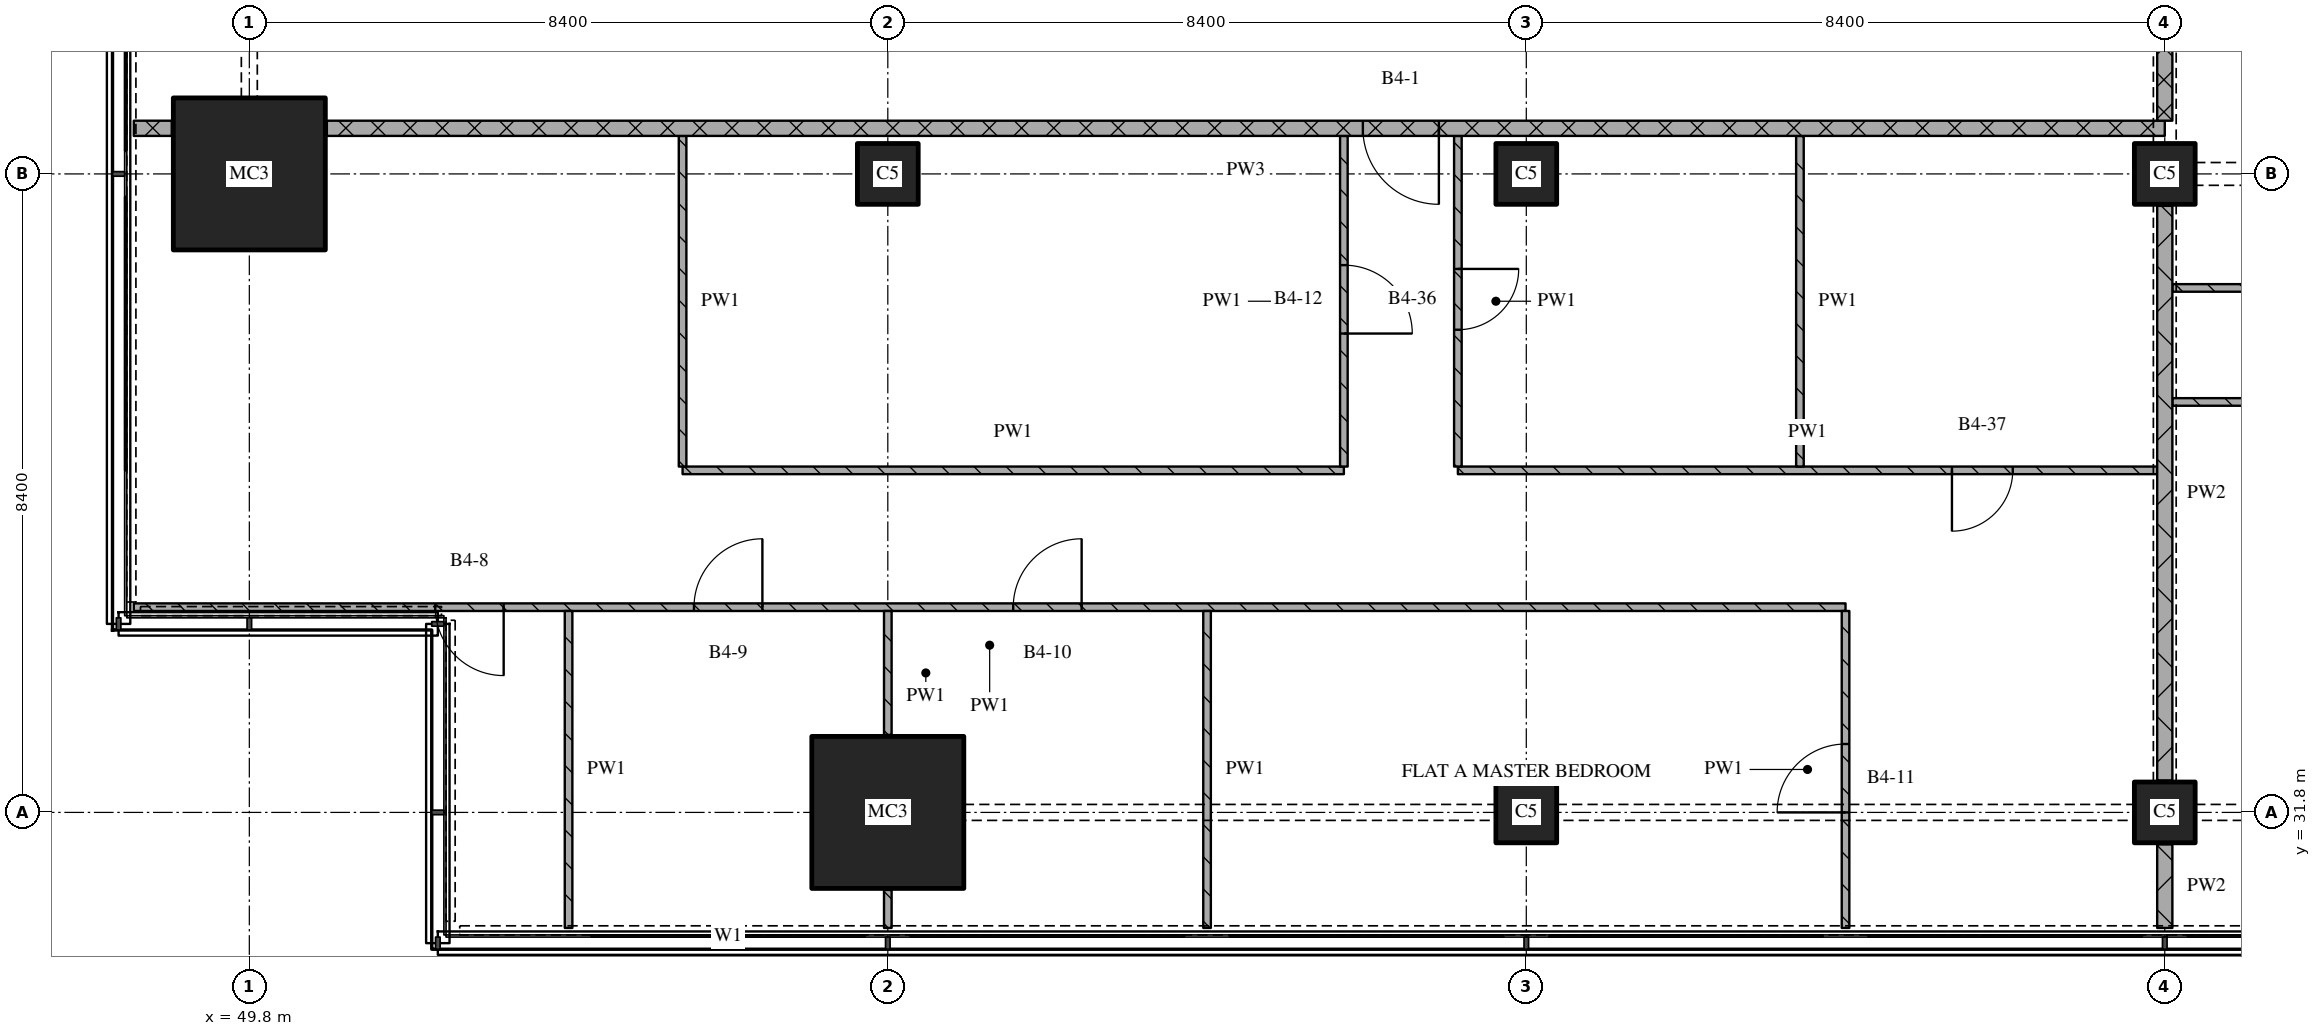
"""IFC4 building model, lengths in metres.
Left out: names, types, materials, properties, quantities, classifications, styles, units other than length and angle.
Written with IfcOpenShell. Run it as: python <this file> out.ifc"""

import sys

from ifc_helpers import new_model, si_unit, direction, frame, frame_2d, origin, origin_2d, place, context, subcontext, project, spatial, rectangle, extrude, element, fill, save


model = new_model("IFC4")
c1 = context("Model", 3, precision=1e-05, world=origin(), true_north=direction((0.0, 1.0)))
c2 = subcontext(c1, "Body", "Model", "MODEL_VIEW")
j1 = project(units=[si_unit("LENGTHUNIT", "METRE"), si_unit("PLANEANGLEUNIT", "RADIAN")], contexts=[c1])
p1 = place(None, origin())
s1 = spatial("IfcSite", under=j1, at=p1, CompositionType="ELEMENT")
p2 = place(p1, origin())
s2 = spatial("IfcBuilding", under=s1, at=p2, CompositionType="ELEMENT")
p3 = place(p2, frame((0.0, 0.0, 131.25)))
s3 = spatial("IfcBuildingStorey", under=s2, at=p3, CompositionType="ELEMENT", Elevation=131.25)
for number, where, z_axis, x_axis in (
    (1, (49.8, 40.2, 0.0), (0.0, 0.0, 1.0), (1.0, 0.0, 0.0)),
    (2, (58.2, 31.8, 0.0), (0.0, 0.0, 1.0), (1.0, 0.0, 0.0)),
):
    element("IfcColumn", number, at=place(p3, frame(where, z_axis=z_axis, x_axis=x_axis)), inside=s3, PredefinedType="COLUMN", context=c2, shape_type="SweptSolid", body=[
        extrude(rectangle(XDim=2.0, YDim=2.0, at=origin_2d()), origin(), (0.0, 0.0, 1.0), 3.6),
    ])
for number, where, z_axis, x_axis in (
    (3, (58.2, 40.2, 0.0), (0.0, 0.0, 1.0), (1.0, 0.0, 0.0)),
    (4, (66.6, 31.8, 0.0), (0.0, 0.0, 1.0), (1.0, 0.0, 0.0)),
    (5, (66.6, 40.2, 0.0), (0.0, 0.0, 1.0), (1.0, 0.0, 0.0)),
    (6, (75.0, 31.8, 0.0), (0.0, 0.0, 1.0), (1.0, 0.0, 0.0)),
    (7, (75.0, 40.2, 0.0), (0.0, 0.0, 1.0), (1.0, 0.0, 0.0)),
):
    element("IfcColumn", number, at=place(p3, frame(where, z_axis=z_axis, x_axis=x_axis)), inside=s3, PredefinedType="COLUMN", context=c2, shape_type="SweptSolid", body=[
        extrude(rectangle(XDim=0.8, YDim=0.8, at=origin_2d()), origin(), (0.0, 0.0, 1.0), 3.6),
    ])
p4 = place(p3, frame((70.8, 34.5, 0.0), z_axis=(0.0, 0.0, 1.0), x_axis=(-1.0, 0.0, 0.0)))
e8 = element("IfcWall", 8, at=p4, inside=s3, PredefinedType="PARTITIONING", context=c2, shape_type="SweptSolid", body=[
    extrude(rectangle(XDim=22.52, YDim=0.1, at=frame_2d((11.26, 0.0))), origin(), (0.0, 0.0, 1.0), 3.32),
])
p5 = place(p4, frame((10.05, 0.0, 0.0)))
e9 = element("IfcOpeningElement", 9, at=p5, cuts=e8, PredefinedType="OPENING", context=c2, shape_type="SweptSolid", body=[
    extrude(rectangle(XDim=0.9, YDim=2.1, at=frame_2d((0.45, 1.05))), frame((0.0, 0.06, 0.0), z_axis=(0.0, -1.0, 0.0), x_axis=(1.0, 0.0, 0.0)), (0.0, 0.0, 1.0), 0.12),
])
p6 = place(p4, frame((14.25, 0.0, 0.0)))
e10 = element("IfcOpeningElement", 10, at=p6, cuts=e8, PredefinedType="OPENING", context=c2, shape_type="SweptSolid", body=[
    extrude(rectangle(XDim=0.9, YDim=2.1, at=frame_2d((0.45, 1.05))), frame((0.0, 0.06, 0.0), z_axis=(0.0, -1.0, 0.0), x_axis=(1.0, 0.0, 0.0)), (0.0, 0.0, 1.0), 0.12),
])
p7 = place(p4, frame((17.654, 0.0, 0.0)))
e11 = element("IfcOpeningElement", 11, at=p7, cuts=e8, PredefinedType="OPENING", context=c2, shape_type="SweptSolid", body=[
    extrude(rectangle(XDim=0.9, YDim=2.1, at=frame_2d((0.45, 1.05))), frame((0.0, 0.06, 0.0), z_axis=(0.0, -1.0, 0.0), x_axis=(1.0, 0.0, 0.0)), (0.0, 0.0, 1.0), 0.12),
])
p8 = place(p3, frame((55.5, 36.3, 0.0), z_axis=(0.0, 0.0, 1.0), x_axis=(1.0, 0.0, 0.0)))
e12 = element("IfcWall", 12, at=p8, inside=s3, PredefinedType="PARTITIONING", context=c2, shape_type="SweptSolid", body=[
    extrude(rectangle(XDim=8.7, YDim=0.1, at=frame_2d((4.35, 0.0))), origin(), (0.0, 0.0, 1.0), 3.32),
])
p9 = place(p3, frame((65.7, 36.3, 0.0), z_axis=(0.0, 0.0, 1.0), x_axis=(1.0, 0.0, 0.0)))
e13 = element("IfcWall", 13, at=p9, inside=s3, PredefinedType="PARTITIONING", context=c2, shape_type="SweptSolid", body=[
    extrude(rectangle(XDim=9.2, YDim=0.1, at=frame_2d((4.6, 0.0))), origin(), (0.0, 0.0, 1.0), 3.32),
])
p10 = place(p9, frame((6.5, 0.0, 0.0)))
e14 = element("IfcOpeningElement", 14, at=p10, cuts=e13, PredefinedType="OPENING", context=c2, shape_type="SweptSolid", body=[
    extrude(rectangle(XDim=0.8, YDim=2.1, at=frame_2d((0.4, 1.05))), frame((0.0, 0.06, 0.0), z_axis=(0.0, -1.0, 0.0), x_axis=(1.0, 0.0, 0.0)), (0.0, 0.0, 1.0), 0.12),
])
p11 = place(p3, frame((96.0, 37.2, 0.0), z_axis=(0.0, 0.0, 1.0), x_axis=(-1.0, 0.0, 0.0)))
e15 = element("IfcWall", 15, at=p11, inside=s3, PredefinedType="PARTITIONING", context=c2, shape_type="SweptSolid", body=[
    extrude(rectangle(XDim=20.9, YDim=0.1, at=frame_2d((10.45, 0.0))), origin(), (0.0, 0.0, 1.0), 3.32),
])
p12 = place(p11, frame((10.05, 0.0, 0.0)))
e16 = element("IfcOpeningElement", 16, at=p12, cuts=e15, PredefinedType="OPENING", context=c2, shape_type="SweptSolid", body=[
    extrude(rectangle(XDim=0.9, YDim=2.1, at=frame_2d((0.45, 1.05))), frame((0.0, 0.06, 0.0), z_axis=(0.0, -1.0, 0.0), x_axis=(1.0, 0.0, 0.0)), (0.0, 0.0, 1.0), 0.12),
])
p13 = place(p11, frame((14.25, 0.0, 0.0)))
e17 = element("IfcOpeningElement", 17, at=p13, cuts=e15, PredefinedType="OPENING", context=c2, shape_type="SweptSolid", body=[
    extrude(rectangle(XDim=0.9, YDim=2.1, at=frame_2d((0.45, 1.05))), frame((0.0, 0.06, 0.0), z_axis=(0.0, -1.0, 0.0), x_axis=(1.0, 0.0, 0.0)), (0.0, 0.0, 1.0), 0.12),
])
p14 = place(p11, frame((18.45, 0.0, 0.0)))
e18 = element("IfcOpeningElement", 18, at=p14, cuts=e15, PredefinedType="OPENING", context=c2, shape_type="SweptSolid", body=[
    extrude(rectangle(XDim=0.9, YDim=2.1, at=frame_2d((0.45, 1.05))), frame((0.0, 0.06, 0.0), z_axis=(0.0, -1.0, 0.0), x_axis=(1.0, 0.0, 0.0)), (0.0, 0.0, 1.0), 0.12),
])
p15 = place(p3, frame((75.1, 38.7, 0.0), z_axis=(0.0, 0.0, 1.0), x_axis=(1.0, 0.0, 0.0)))
e19 = element("IfcWall", 19, at=p15, inside=s3, PredefinedType="PARTITIONING", context=c2, shape_type="SweptSolid", body=[
    extrude(rectangle(XDim=7.1, YDim=0.1, at=frame_2d((3.55, 0.0))), origin(), (0.0, 0.0, 1.0), 3.32),
])
p16 = place(p15, frame((1.75, 0.0, 0.0)))
e20 = element("IfcOpeningElement", 20, at=p16, cuts=e19, PredefinedType="OPENING", context=c2, shape_type="SweptSolid", body=[
    extrude(rectangle(XDim=0.8, YDim=2.1, at=frame_2d((0.4, 1.05))), frame((0.0, 0.06, 0.0), z_axis=(0.0, -1.0, 0.0), x_axis=(1.0, 0.0, 0.0)), (0.0, 0.0, 1.0), 0.12),
])
p17 = place(p3, frame((48.28, 40.8, 0.0), z_axis=(0.0, 0.0, 1.0), x_axis=(1.0, 0.0, 0.0)))
e21 = element("IfcWall", 21, at=p17, inside=s3, PredefinedType="PARTITIONING", context=c2, shape_type="SweptSolid", body=[
    extrude(rectangle(XDim=0.5, YDim=0.2, at=frame_2d((0.25, 0.0))), origin(), (0.0, 0.0, 1.0), 3.32),
])
p18 = place(p3, frame((75.0, 40.8, 0.0), z_axis=(0.0, 0.0, 1.0), x_axis=(-1.0, 0.0, 0.0)))
e22 = element("IfcWall", 22, at=p18, inside=s3, PredefinedType="PARTITIONING", context=c2, shape_type="SweptSolid", body=[
    extrude(rectangle(XDim=24.18, YDim=0.2, at=frame_2d((12.09, 0.0))), origin(), (0.0, 0.0, 1.0), 3.32),
])
p19 = place(p18, frame((9.55, 0.0, 0.0)))
e23 = element("IfcOpeningElement", 23, at=p19, cuts=e22, PredefinedType="OPENING", context=c2, shape_type="SweptSolid", body=[
    extrude(rectangle(XDim=1.0, YDim=2.1, at=frame_2d((0.5, 1.05))), frame((0.0, 0.11, 0.0), z_axis=(0.0, -1.0, 0.0), x_axis=(1.0, 0.0, 0.0)), (0.0, 0.0, 1.0), 0.22),
])
p20 = place(p3, frame((54.0, 34.45, 0.0), z_axis=(0.0, 0.0, 1.0), x_axis=(0.0, -1.0, 0.0)))
e24 = element("IfcWall", 24, at=p20, inside=s3, PredefinedType="PARTITIONING", context=c2, shape_type="SweptSolid", body=[
    extrude(rectangle(XDim=4.17, YDim=0.1, at=frame_2d((2.085, 0.0))), origin(), (0.0, 0.0, 1.0), 3.32),
])
p21 = place(p3, frame((55.5, 40.7, 0.0), z_axis=(0.0, 0.0, 1.0), x_axis=(0.0, -1.0, 0.0)))
e25 = element("IfcWall", 25, at=p21, inside=s3, PredefinedType="PARTITIONING", context=c2, shape_type="SweptSolid", body=[
    extrude(rectangle(XDim=4.35, YDim=0.1, at=frame_2d((2.175, 0.0))), origin(), (0.0, 0.0, 1.0), 3.32),
])
p22 = place(p3, frame((58.2, 30.78, 0.0), z_axis=(0.0, 0.0, 1.0), x_axis=(0.0, -1.0, 0.0)))
e26 = element("IfcWall", 26, at=p22, inside=s3, PredefinedType="PARTITIONING", context=c2, shape_type="SweptSolid", body=[
    extrude(rectangle(XDim=0.5, YDim=0.1, at=frame_2d((0.25, 0.0))), origin(), (0.0, 0.0, 1.0), 3.32),
])
p23 = place(p3, frame((58.2, 34.45, 0.0), z_axis=(0.0, 0.0, 1.0), x_axis=(0.0, -1.0, 0.0)))
e27 = element("IfcWall", 27, at=p23, inside=s3, PredefinedType="PARTITIONING", context=c2, shape_type="SweptSolid", body=[
    extrude(rectangle(XDim=1.63, YDim=0.1, at=frame_2d((0.815, 0.0))), origin(), (0.0, 0.0, 1.0), 3.32),
])
p24 = place(p3, frame((62.4, 34.45, 0.0), z_axis=(0.0, 0.0, 1.0), x_axis=(0.0, -1.0, 0.0)))
e28 = element("IfcWall", 28, at=p24, inside=s3, PredefinedType="PARTITIONING", context=c2, shape_type="SweptSolid", body=[
    extrude(rectangle(XDim=4.17, YDim=0.1, at=frame_2d((2.085, 0.0))), origin(), (0.0, 0.0, 1.0), 3.32),
])
p25 = place(p3, frame((64.2, 36.35, 0.0), z_axis=(0.0, 0.0, 1.0), x_axis=(0.0, 1.0, 0.0)))
e29 = element("IfcWall", 29, at=p25, inside=s3, PredefinedType="PARTITIONING", context=c2, shape_type="SweptSolid", body=[
    extrude(rectangle(XDim=4.35, YDim=0.1, at=frame_2d((2.175, 0.0))), origin(), (0.0, 0.0, 1.0), 3.32),
])
p26 = place(p25, frame((1.75, 0.0, 0.0)))
e30 = element("IfcOpeningElement", 30, at=p26, cuts=e29, PredefinedType="OPENING", context=c2, shape_type="SweptSolid", body=[
    extrude(rectangle(XDim=0.9, YDim=2.1, at=frame_2d((0.45, 1.05))), frame((0.0, 0.06, 0.0), z_axis=(0.0, -1.0, 0.0), x_axis=(1.0, 0.0, 0.0)), (0.0, 0.0, 1.0), 0.12),
])
p27 = place(p3, frame((65.7, 40.7, 0.0), z_axis=(0.0, 0.0, 1.0), x_axis=(0.0, -1.0, 0.0)))
e31 = element("IfcWall", 31, at=p27, inside=s3, PredefinedType="PARTITIONING", context=c2, shape_type="SweptSolid", body=[
    extrude(rectangle(XDim=4.35, YDim=0.1, at=frame_2d((2.175, 0.0))), origin(), (0.0, 0.0, 1.0), 3.32),
])
p28 = place(p27, frame((1.75, 0.0, 0.0)))
e32 = element("IfcOpeningElement", 32, at=p28, cuts=e31, PredefinedType="OPENING", context=c2, shape_type="SweptSolid", body=[
    extrude(rectangle(XDim=0.8, YDim=2.1, at=frame_2d((0.4, 1.05))), frame((0.0, 0.06, 0.0), z_axis=(0.0, -1.0, 0.0), x_axis=(1.0, 0.0, 0.0)), (0.0, 0.0, 1.0), 0.12),
])
p29 = place(p3, frame((70.2, 40.7, 0.0), z_axis=(0.0, 0.0, 1.0), x_axis=(0.0, -1.0, 0.0)))
e33 = element("IfcWall", 33, at=p29, inside=s3, PredefinedType="PARTITIONING", context=c2, shape_type="SweptSolid", body=[
    extrude(rectangle(XDim=4.35, YDim=0.1, at=frame_2d((2.175, 0.0))), origin(), (0.0, 0.0, 1.0), 3.32),
])
p30 = place(p3, frame((70.8, 30.28, 0.0), z_axis=(0.0, 0.0, 1.0), x_axis=(0.0, 1.0, 0.0)))
e34 = element("IfcWall", 34, at=p30, inside=s3, PredefinedType="PARTITIONING", context=c2, shape_type="SweptSolid", body=[
    extrude(rectangle(XDim=4.17, YDim=0.1, at=frame_2d((2.085, 0.0))), origin(), (0.0, 0.0, 1.0), 3.32),
])
p31 = place(p30, frame((1.52, 0.0, 0.0)))
e35 = element("IfcOpeningElement", 35, at=p31, cuts=e34, PredefinedType="OPENING", context=c2, shape_type="SweptSolid", body=[
    extrude(rectangle(XDim=0.9, YDim=2.1, at=frame_2d((0.45, 1.05))), frame((0.0, 0.06, 0.0), z_axis=(0.0, -1.0, 0.0), x_axis=(1.0, 0.0, 0.0)), (0.0, 0.0, 1.0), 0.12),
])
p32 = place(p3, frame((75.0, 43.1, 0.0), z_axis=(0.0, 0.0, 1.0), x_axis=(0.0, -1.0, 0.0)))
e36 = element("IfcWall", 36, at=p32, inside=s3, PredefinedType="PARTITIONING", context=c2, shape_type="SweptSolid", body=[
    extrude(rectangle(XDim=2.2, YDim=0.2, at=frame_2d((1.1, 0.0))), origin(), (0.0, 0.0, 1.0), 2.43),
])
p33 = place(p3, frame((75.0, 31.38, 0.0), z_axis=(0.0, 0.0, 1.0), x_axis=(0.0, -1.0, 0.0)))
e37 = element("IfcWall", 37, at=p33, inside=s3, PredefinedType="PARTITIONING", context=c2, shape_type="SweptSolid", body=[
    extrude(rectangle(XDim=1.1, YDim=0.2, at=frame_2d((0.55, 0.0))), origin(), (0.0, 0.0, 1.0), 3.32),
])
p34 = place(p3, frame((75.0, 39.78, 0.0), z_axis=(0.0, 0.0, 1.0), x_axis=(0.0, -1.0, 0.0)))
e38 = element("IfcWall", 38, at=p34, inside=s3, PredefinedType="PARTITIONING", context=c2, shape_type="SweptSolid", body=[
    extrude(rectangle(XDim=7.56, YDim=0.2, at=frame_2d((3.78, 0.0))), origin(), (0.0, 0.0, 1.0), 2.83),
])
p35 = place(p5, origin())
e39 = element("IfcDoor", 39, at=p35, inside=s3, OperationType="SINGLE_SWING_RIGHT", PredefinedType="DOOR", context=c2, shape_type="SweptSolid", body=[
    extrude(rectangle(XDim=0.9, YDim=2.1, at=frame_2d((0.45, 1.05))), frame((0.0, 0.025, 0.0), z_axis=(0.0, -1.0, 0.0), x_axis=(1.0, 0.0, 0.0)), (0.0, 0.0, 1.0), 0.05),
])
fill(e9, e39)
p36 = place(p6, origin())
e40 = element("IfcDoor", 40, at=p36, inside=s3, OperationType="SINGLE_SWING_RIGHT", PredefinedType="DOOR", context=c2, shape_type="SweptSolid", body=[
    extrude(rectangle(XDim=0.9, YDim=2.1, at=frame_2d((0.45, 1.05))), frame((0.0, 0.025, 0.0), z_axis=(0.0, -1.0, 0.0), x_axis=(1.0, 0.0, 0.0)), (0.0, 0.0, 1.0), 0.05),
])
fill(e10, e40)
p37 = place(p7, origin())
e41 = element("IfcDoor", 41, at=p37, inside=s3, OperationType="SINGLE_SWING_LEFT", PredefinedType="DOOR", context=c2, shape_type="SweptSolid", body=[
    extrude(rectangle(XDim=0.9, YDim=2.1, at=frame_2d((0.45, 1.05))), frame((0.0, 0.025, 0.0), z_axis=(0.0, -1.0, 0.0), x_axis=(1.0, 0.0, 0.0)), (0.0, 0.0, 1.0), 0.05),
])
fill(e11, e41)
p38 = place(p10, origin())
e42 = element("IfcDoor", 42, at=p38, inside=s3, OperationType="SINGLE_SWING_RIGHT", PredefinedType="DOOR", context=c2, shape_type="SweptSolid", body=[
    extrude(rectangle(XDim=0.8, YDim=2.1, at=frame_2d((0.4, 1.05))), frame((0.0, 0.025, 0.0), z_axis=(0.0, -1.0, 0.0), x_axis=(1.0, 0.0, 0.0)), (0.0, 0.0, 1.0), 0.05),
])
fill(e14, e42)
p39 = place(p19, origin())
e43 = element("IfcDoor", 43, at=p39, inside=s3, OperationType="SINGLE_SWING_LEFT", PredefinedType="DOOR", context=c2, shape_type="SweptSolid", body=[
    extrude(rectangle(XDim=1.0, YDim=2.1, at=frame_2d((0.5, 1.05))), frame((0.0, 0.025, 0.0), z_axis=(0.0, -1.0, 0.0), x_axis=(1.0, 0.0, 0.0)), (0.0, 0.0, 1.0), 0.05),
])
fill(e23, e43)
p40 = place(p26, origin())
e44 = element("IfcDoor", 44, at=p40, inside=s3, OperationType="SINGLE_SWING_RIGHT", PredefinedType="DOOR", context=c2, shape_type="SweptSolid", body=[
    extrude(rectangle(XDim=0.9, YDim=2.1, at=frame_2d((0.45, 1.05))), frame((0.0, 0.025, 0.0), z_axis=(0.0, -1.0, 0.0), x_axis=(1.0, 0.0, 0.0)), (0.0, 0.0, 1.0), 0.05),
])
fill(e30, e44)
p41 = place(p28, origin())
e45 = element("IfcDoor", 45, at=p41, inside=s3, OperationType="SINGLE_SWING_LEFT", PredefinedType="DOOR", context=c2, shape_type="SweptSolid", body=[
    extrude(rectangle(XDim=0.8, YDim=2.1, at=frame_2d((0.4, 1.05))), frame((0.0, 0.025, 0.0), z_axis=(0.0, -1.0, 0.0), x_axis=(1.0, 0.0, 0.0)), (0.0, 0.0, 1.0), 0.05),
])
fill(e32, e45)
p42 = place(p31, origin())
e46 = element("IfcDoor", 46, at=p42, inside=s3, OperationType="SINGLE_SWING_LEFT", PredefinedType="DOOR", context=c2, shape_type="SweptSolid", body=[
    extrude(rectangle(XDim=0.9, YDim=2.1, at=frame_2d((0.45, 1.05))), frame((0.0, 0.025, 0.0), z_axis=(0.0, -1.0, 0.0), x_axis=(1.0, 0.0, 0.0)), (0.0, 0.0, 1.0), 0.05),
])
fill(e35, e46)
save(model, sys.argv[1])
